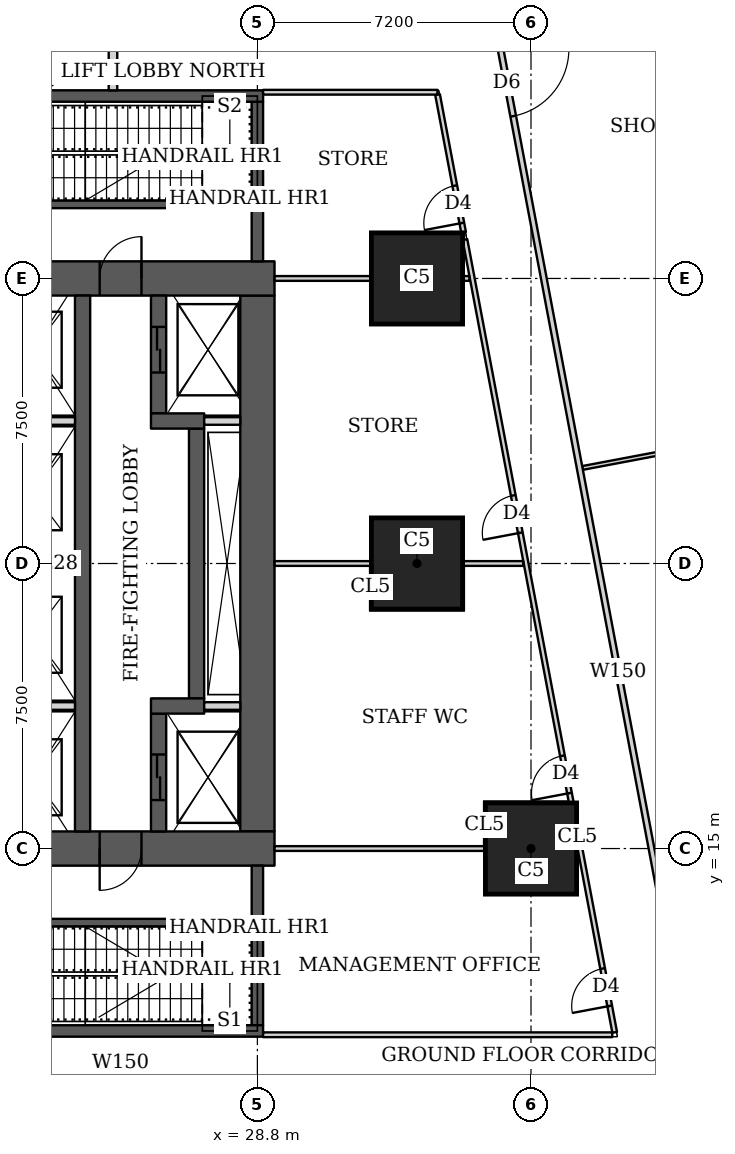
"""IFC4 building model, lengths in metres.
Left out: names, types, materials, properties, quantities, classifications, styles, units other than length and angle.
Written with IfcOpenShell. Run it as: python <this file> out.ifc"""

import sys

from ifc_helpers import new_model, si_unit, direction, frame, frame_2d, origin, origin_2d, place, context, subcontext, project, spatial, rectangle, extrude, element, fill, save


model = new_model("IFC4")
c1 = context("Model", 3, precision=1e-05, world=origin(), true_north=direction((0.0, 1.0)))
c2 = subcontext(c1, "Body", "Model", "MODEL_VIEW")
j1 = project(units=[si_unit("LENGTHUNIT", "METRE"), si_unit("PLANEANGLEUNIT", "RADIAN")], contexts=[c1])
p1 = place(None, origin())
s1 = spatial("IfcSite", under=j1, at=p1, CompositionType="ELEMENT")
p2 = place(p1, origin())
s2 = spatial("IfcBuilding", under=s1, at=p2, CompositionType="ELEMENT")
p3 = place(p2, origin())
s3 = spatial("IfcBuildingStorey", under=s2, at=p3, CompositionType="ELEMENT", Elevation=0.0)
for number, where, z_axis, x_axis in (
    (1, (36.0, 15.0, 0.0), (0.0, 0.0, 1.0), (1.0, 0.0, 0.0)),
    (2, (33.0, 22.5, 0.0), (0.0, 0.0, 1.0), (1.0, 0.0, 0.0)),
    (3, (33.0, 30.0, 0.0), (0.0, 0.0, 1.0), (1.0, 0.0, 0.0)),
):
    element("IfcColumn", number, at=place(p3, frame(where, z_axis=z_axis, x_axis=x_axis)), inside=s3, PredefinedType="COLUMN", context=c2, shape_type="SweptSolid", body=[
        extrude(rectangle(XDim=2.4, YDim=2.4, at=origin_2d()), origin(), (0.0, 0.0, 1.0), 5.6),
    ])
p4 = place(p3, frame((13.95, 15.0, 0.0), z_axis=(0.0, 0.0, 1.0), x_axis=(1.0, 0.0, 0.0)))
e4 = element("IfcWall", 4, at=p4, inside=s3, PredefinedType="SHEAR", context=c2, shape_type="SweptSolid", body=[
    extrude(rectangle(XDim=15.3, YDim=0.9, at=frame_2d((7.65, 0.0))), origin(), (0.0, 0.0, 1.0), 5.6),
])
p5 = place(p4, frame((4.45, 0.0, 0.0)))
e5 = element("IfcOpeningElement", 5, at=p5, cuts=e4, PredefinedType="OPENING", context=c2, shape_type="SweptSolid", body=[
    extrude(rectangle(XDim=1.8, YDim=2.1, at=frame_2d((0.9, 1.05))), frame((0.0, 0.46, 0.0), z_axis=(0.0, -1.0, 0.0), x_axis=(1.0, 0.0, 0.0)), (0.0, 0.0, 1.0), 0.92),
])
p6 = place(p4, frame((10.7, 0.0, 0.0)))
e6 = element("IfcOpeningElement", 6, at=p6, cuts=e4, PredefinedType="OPENING", context=c2, shape_type="SweptSolid", body=[
    extrude(rectangle(XDim=1.1, YDim=2.1, at=frame_2d((0.55, 1.05))), frame((0.0, 0.46, 0.0), z_axis=(0.0, -1.0, 0.0), x_axis=(1.0, 0.0, 0.0)), (0.0, 0.0, 1.0), 0.92),
])
p7 = place(p3, frame((13.95, 30.0, 0.0), z_axis=(0.0, 0.0, 1.0), x_axis=(1.0, 0.0, 0.0)))
e7 = element("IfcWall", 7, at=p7, inside=s3, PredefinedType="SHEAR", context=c2, shape_type="SweptSolid", body=[
    extrude(rectangle(XDim=15.3, YDim=0.9, at=frame_2d((7.65, 0.0))), origin(), (0.0, 0.0, 1.0), 5.6),
])
p8 = place(p7, frame((4.45, 0.0, 0.0)))
e8 = element("IfcOpeningElement", 8, at=p8, cuts=e7, PredefinedType="OPENING", context=c2, shape_type="SweptSolid", body=[
    extrude(rectangle(XDim=1.8, YDim=2.1, at=frame_2d((0.9, 1.05))), frame((0.0, 0.46, 0.0), z_axis=(0.0, -1.0, 0.0), x_axis=(1.0, 0.0, 0.0)), (0.0, 0.0, 1.0), 0.92),
])
p9 = place(p7, frame((10.7, 0.0, 0.0)))
e9 = element("IfcOpeningElement", 9, at=p9, cuts=e7, PredefinedType="OPENING", context=c2, shape_type="SweptSolid", body=[
    extrude(rectangle(XDim=1.1, YDim=2.1, at=frame_2d((0.55, 1.05))), frame((0.0, 0.46, 0.0), z_axis=(0.0, -1.0, 0.0), x_axis=(1.0, 0.0, 0.0)), (0.0, 0.0, 1.0), 0.92),
])
p10 = place(p3, frame((28.8, 15.45, 0.0), z_axis=(0.0, 0.0, 1.0), x_axis=(0.0, 1.0, 0.0)))
e10 = element("IfcWall", 10, at=p10, inside=s3, PredefinedType="SHEAR", context=c2, shape_type="SweptSolid", body=[
    extrude(rectangle(XDim=14.1, YDim=0.9, at=frame_2d((7.05, 0.0))), origin(), (0.0, 0.0, 1.0), 5.6),
])
p11 = place(p3, frame((24.2, 15.45, 0.0), z_axis=(0.0, 0.0, 1.0), x_axis=(0.0, 1.0, 0.0)))
e11 = element("IfcWall", 11, at=p11, inside=s3, PredefinedType="SHEAR", context=c2, shape_type="SweptSolid", body=[
    extrude(rectangle(XDim=14.1, YDim=0.4, at=frame_2d((7.05, 0.0))), origin(), (0.0, 0.0, 1.0), 5.6),
])
p12 = place(p3, frame((26.2, 15.45, 0.0), z_axis=(0.0, 0.0, 1.0), x_axis=(0.0, 1.0, 0.0)))
e12 = element("IfcWall", 12, at=p12, inside=s3, PredefinedType="SHEAR", context=c2, shape_type="SweptSolid", body=[
    extrude(rectangle(XDim=3.1, YDim=0.4, at=frame_2d((1.55, 0.0))), origin(), (0.0, 0.0, 1.0), 5.6),
])
p13 = place(p12, frame((0.825, 0.0, 0.0)))
e13 = element("IfcOpeningElement", 13, at=p13, cuts=e12, PredefinedType="OPENING", context=c2, shape_type="SweptSolid", body=[
    extrude(rectangle(XDim=1.2, YDim=2.1, at=frame_2d((0.6, 1.05))), frame((0.0, 0.21, 0.0), z_axis=(0.0, -1.0, 0.0), x_axis=(1.0, 0.0, 0.0)), (0.0, 0.0, 1.0), 0.42),
])
p14 = place(p3, frame((26.0, 18.75, 0.0), z_axis=(0.0, 0.0, 1.0), x_axis=(1.0, 0.0, 0.0)))
e14 = element("IfcWall", 14, at=p14, inside=s3, PredefinedType="SHEAR", context=c2, shape_type="SweptSolid", body=[
    extrude(rectangle(XDim=1.4, YDim=0.4, at=frame_2d((0.7, 0.0))), origin(), (0.0, 0.0, 1.0), 5.6),
])
p15 = place(p3, frame((27.2, 18.95, 0.0), z_axis=(0.0, 0.0, 1.0), x_axis=(0.0, 1.0, 0.0)))
e15 = element("IfcWall", 15, at=p15, inside=s3, PredefinedType="SHEAR", context=c2, shape_type="SweptSolid", body=[
    extrude(rectangle(XDim=7.1, YDim=0.4, at=frame_2d((3.55, 0.0))), origin(), (0.0, 0.0, 1.0), 5.6),
])
p16 = place(p3, frame((26.0, 26.25, 0.0), z_axis=(0.0, 0.0, 1.0), x_axis=(1.0, 0.0, 0.0)))
e16 = element("IfcWall", 16, at=p16, inside=s3, PredefinedType="SHEAR", context=c2, shape_type="SweptSolid", body=[
    extrude(rectangle(XDim=1.4, YDim=0.4, at=frame_2d((0.7, 0.0))), origin(), (0.0, 0.0, 1.0), 5.6),
])
p17 = place(p3, frame((26.2, 26.45, 0.0), z_axis=(0.0, 0.0, 1.0), x_axis=(0.0, 1.0, 0.0)))
e17 = element("IfcWall", 17, at=p17, inside=s3, PredefinedType="SHEAR", context=c2, shape_type="SweptSolid", body=[
    extrude(rectangle(XDim=3.1, YDim=0.4, at=frame_2d((1.55, 0.0))), origin(), (0.0, 0.0, 1.0), 5.6),
])
p18 = place(p17, frame((1.075, 0.0, 0.0)))
e18 = element("IfcOpeningElement", 18, at=p18, cuts=e17, PredefinedType="OPENING", context=c2, shape_type="SweptSolid", body=[
    extrude(rectangle(XDim=1.2, YDim=2.1, at=frame_2d((0.6, 1.05))), frame((0.0, 0.21, 0.0), z_axis=(0.0, -1.0, 0.0), x_axis=(1.0, 0.0, 0.0)), (0.0, 0.0, 1.0), 0.42),
])
p19 = place(p3, frame((21.45, 10.2, 0.0), z_axis=(0.0, 0.0, 1.0), x_axis=(1.0, 0.0, 0.0)))
e19 = element("IfcWall", 19, at=p19, inside=s3, PredefinedType="SHEAR", context=c2, shape_type="SweptSolid", body=[
    extrude(rectangle(XDim=7.5, YDim=0.3, at=frame_2d((3.75, 0.0))), origin(), (0.0, 0.0, 1.0), 5.6),
])
p20 = place(p19, frame((0.5, 0.0, 0.0)))
e20 = element("IfcOpeningElement", 20, at=p20, cuts=e19, PredefinedType="OPENING", context=c2, shape_type="SweptSolid", body=[
    extrude(rectangle(XDim=1.1, YDim=2.1, at=frame_2d((0.55, 1.05))), frame((0.0, 0.16, 0.0), z_axis=(0.0, -1.0, 0.0), x_axis=(1.0, 0.0, 0.0)), (0.0, 0.0, 1.0), 0.32),
])
p21 = place(p3, frame((28.8, 10.35, 0.0), z_axis=(0.0, 0.0, 1.0), x_axis=(0.0, 1.0, 0.0)))
e21 = element("IfcWall", 21, at=p21, inside=s3, PredefinedType="SHEAR", context=c2, shape_type="SweptSolid", body=[
    extrude(rectangle(XDim=4.2, YDim=0.3, at=frame_2d((2.1, 0.0))), origin(), (0.0, 0.0, 1.0), 5.6),
])
p22 = place(p3, frame((21.45, 34.8, 0.0), z_axis=(0.0, 0.0, 1.0), x_axis=(1.0, 0.0, 0.0)))
e22 = element("IfcWall", 22, at=p22, inside=s3, PredefinedType="SHEAR", context=c2, shape_type="SweptSolid", body=[
    extrude(rectangle(XDim=7.5, YDim=0.3, at=frame_2d((3.75, 0.0))), origin(), (0.0, 0.0, 1.0), 5.6),
])
p23 = place(p22, frame((0.5, 0.0, 0.0)))
e23 = element("IfcOpeningElement", 23, at=p23, cuts=e22, PredefinedType="OPENING", context=c2, shape_type="SweptSolid", body=[
    extrude(rectangle(XDim=1.1, YDim=2.1, at=frame_2d((0.55, 1.05))), frame((0.0, 0.16, 0.0), z_axis=(0.0, -1.0, 0.0), x_axis=(1.0, 0.0, 0.0)), (0.0, 0.0, 1.0), 0.32),
])
p24 = place(p3, frame((28.8, 30.45, 0.0), z_axis=(0.0, 0.0, 1.0), x_axis=(0.0, 1.0, 0.0)))
e24 = element("IfcWall", 24, at=p24, inside=s3, PredefinedType="SHEAR", context=c2, shape_type="SweptSolid", body=[
    extrude(rectangle(XDim=4.2, YDim=0.3, at=frame_2d((2.1, 0.0))), origin(), (0.0, 0.0, 1.0), 5.6),
])
p25 = place(p3, frame((35.151, 36.285, 0.0), z_axis=(0.0, 0.0, 1.0), x_axis=(0.185575970071, -0.982629919823, 0.0)))
e25 = element("IfcWall", 25, at=p25, inside=s3, PredefinedType="SOLIDWALL", context=c2, shape_type="SweptSolid", body=[
    extrude(rectangle(XDim=33.841, YDim=0.15, at=frame_2d((16.92, 0.0))), origin(), (0.0, 0.0, 1.0), 3.7),
])
p26 = place(p25, frame((0.25, 0.0, 0.0)))
e26 = element("IfcOpeningElement", 26, at=p26, cuts=e25, PredefinedType="OPENING", context=c2, shape_type="SweptSolid", body=[
    extrude(rectangle(XDim=1.8, YDim=2.1, at=frame_2d((0.9, 1.05))), frame((0.0, 0.085, 0.0), z_axis=(0.0, -1.0, 0.0), x_axis=(1.0, 0.0, 0.0)), (0.0, 0.0, 1.0), 0.17),
])
p27 = place(p25, frame((24.261, 0.0, 0.0)))
e27 = element("IfcOpeningElement", 27, at=p27, cuts=e25, PredefinedType="OPENING", context=c2, shape_type="SweptSolid", body=[
    extrude(rectangle(XDim=1.8, YDim=2.1, at=frame_2d((0.9, 1.05))), frame((0.0, 0.085, 0.0), z_axis=(0.0, -1.0, 0.0), x_axis=(1.0, 0.0, 0.0)), (0.0, 0.0, 1.0), 0.17),
])
p28 = place(p3, frame((25.0, 34.95, 0.0), z_axis=(0.0, 0.0, 1.0), x_axis=(0.0, 1.0, 0.0)))
e28 = element("IfcWall", 28, at=p28, inside=s3, PredefinedType="SOLIDWALL", context=c2, shape_type="SweptSolid", body=[
    extrude(rectangle(XDim=8.65, YDim=0.225, at=frame_2d((4.325, 0.0))), origin(), (0.0, 0.0, 1.0), 3.5),
])
p29 = place(p3, frame((43.988, 26.267, 0.0), z_axis=(0.0, 0.0, 1.0), x_axis=(-0.982612004876, -0.185670805118, 0.0)))
e29 = element("IfcWall", 29, at=p29, inside=s3, PredefinedType="PARTITIONING", context=c2, shape_type="SweptSolid", body=[
    extrude(rectangle(XDim=6.75, YDim=0.1, at=frame_2d((3.375, 0.0))), origin(), (0.0, 0.0, 1.0), 3.5),
])
p30 = place(p3, frame((28.95, 10.1, 0.0), z_axis=(0.0, 0.0, 1.0), x_axis=(1.0, 0.0, 0.0)))
e30 = element("IfcWall", 30, at=p30, inside=s3, PredefinedType="PARTITIONING", context=c2, shape_type="SweptSolid", body=[
    extrude(rectangle(XDim=9.188, YDim=0.125, at=frame_2d((4.594, 0.0))), origin(), (0.0, 0.0, 1.0), 3.3),
])
p31 = place(p3, frame((28.95, 34.9, 0.0), z_axis=(0.0, 0.0, 1.0), x_axis=(1.0, 0.0, 0.0)))
e31 = element("IfcWall", 31, at=p31, inside=s3, PredefinedType="PARTITIONING", context=c2, shape_type="SweptSolid", body=[
    extrude(rectangle(XDim=4.588, YDim=0.125, at=frame_2d((2.294, 0.0))), origin(), (0.0, 0.0, 1.0), 3.3),
])
p32 = place(p3, frame((38.202, 10.163, 0.0), z_axis=(0.0, 0.0, 1.0), x_axis=(-0.185539561605, 0.982636795097, 0.0)))
e32 = element("IfcWall", 32, at=p32, inside=s3, PredefinedType="PARTITIONING", context=c2, shape_type="SweptSolid", body=[
    extrude(rectangle(XDim=5.066, YDim=0.125, at=frame_2d((2.533, 0.0))), origin(), (0.0, 0.0, 1.0), 3.7),
])
p33 = place(p32, frame((0.708, 0.0, 0.0)))
e33 = element("IfcOpeningElement", 33, at=p33, cuts=e32, PredefinedType="OPENING", context=c2, shape_type="SweptSolid", body=[
    extrude(rectangle(XDim=1.0, YDim=2.1, at=frame_2d((0.5, 1.05))), frame((0.0, 0.073, 0.0), z_axis=(0.0, -1.0, 0.0), x_axis=(1.0, 0.0, 0.0)), (0.0, 0.0, 1.0), 0.145),
])
p34 = place(p3, frame((37.059, 16.213, 0.0), z_axis=(0.0, 0.0, 1.0), x_axis=(-0.185585225745, 0.982628171785, 0.0)))
e34 = element("IfcWall", 34, at=p34, inside=s3, PredefinedType="PARTITIONING", context=c2, shape_type="SweptSolid", body=[
    extrude(rectangle(XDim=15.072, YDim=0.125, at=frame_2d((7.536, 0.0))), origin(), (0.0, 0.0, 1.0), 3.7),
])
p35 = place(p34, frame((0.25, 0.0, 0.0)))
e35 = element("IfcOpeningElement", 35, at=p35, cuts=e34, PredefinedType="OPENING", context=c2, shape_type="SweptSolid", body=[
    extrude(rectangle(XDim=1.0, YDim=2.1, at=frame_2d((0.5, 1.05))), frame((0.0, 0.073, 0.0), z_axis=(0.0, -1.0, 0.0), x_axis=(1.0, 0.0, 0.0)), (0.0, 0.0, 1.0), 0.145),
])
p36 = place(p34, frame((7.221, 0.0, 0.0)))
e36 = element("IfcOpeningElement", 36, at=p36, cuts=e34, PredefinedType="OPENING", context=c2, shape_type="SweptSolid", body=[
    extrude(rectangle(XDim=1.0, YDim=2.1, at=frame_2d((0.5, 1.05))), frame((0.0, 0.073, 0.0), z_axis=(0.0, -1.0, 0.0), x_axis=(1.0, 0.0, 0.0)), (0.0, 0.0, 1.0), 0.145),
])
p37 = place(p3, frame((34.226, 31.213, 0.0), z_axis=(0.0, 0.0, 1.0), x_axis=(-0.185694811189, 0.982607468472, 0.0)))
e37 = element("IfcWall", 37, at=p37, inside=s3, PredefinedType="PARTITIONING", context=c2, shape_type="SweptSolid", body=[
    extrude(rectangle(XDim=3.689, YDim=0.125, at=frame_2d((1.845, 0.0))), origin(), (0.0, 0.0, 1.0), 5.3),
])
p38 = place(p37, frame((0.25, 0.0, 0.0)))
e38 = element("IfcOpeningElement", 38, at=p38, cuts=e37, PredefinedType="OPENING", context=c2, shape_type="SweptSolid", body=[
    extrude(rectangle(XDim=1.0, YDim=2.1, at=frame_2d((0.5, 1.05))), frame((0.0, 0.073, 0.0), z_axis=(0.0, -1.0, 0.0), x_axis=(1.0, 0.0, 0.0)), (0.0, 0.0, 1.0), 0.145),
])
p39 = place(p3, frame((29.25, 15.0, 0.0), z_axis=(0.0, 0.0, 1.0), x_axis=(1.0, 0.0, 0.0)))
e39 = element("IfcWall", 39, at=p39, inside=s3, PredefinedType="PARTITIONING", context=c2, shape_type="SweptSolid", body=[
    extrude(rectangle(XDim=5.549, YDim=0.125, at=frame_2d((2.774, 0.0))), origin(), (0.0, 0.0, 1.0), 5.3),
])
p40 = place(p3, frame((29.25, 22.5, 0.0), z_axis=(0.0, 0.0, 1.0), x_axis=(1.0, 0.0, 0.0)))
e40 = element("IfcWall", 40, at=p40, inside=s3, PredefinedType="PARTITIONING", context=c2, shape_type="SweptSolid", body=[
    extrude(rectangle(XDim=2.549, YDim=0.125, at=frame_2d((1.274, 0.0))), origin(), (0.0, 0.0, 1.0), 3.7),
])
p41 = place(p3, frame((34.201, 22.5, 0.0), z_axis=(0.0, 0.0, 1.0), x_axis=(1.0, 0.0, 0.0)))
e41 = element("IfcWall", 41, at=p41, inside=s3, PredefinedType="PARTITIONING", context=c2, shape_type="SweptSolid", body=[
    extrude(rectangle(XDim=1.595, YDim=0.125, at=frame_2d((0.797, 0.0))), origin(), (0.0, 0.0, 1.0), 3.7),
])
p42 = place(p3, frame((29.25, 30.0, 0.0), z_axis=(0.0, 0.0, 1.0), x_axis=(1.0, 0.0, 0.0)))
e42 = element("IfcWall", 42, at=p42, inside=s3, PredefinedType="PARTITIONING", context=c2, shape_type="SweptSolid", body=[
    extrude(rectangle(XDim=2.549, YDim=0.125, at=frame_2d((1.274, 0.0))), origin(), (0.0, 0.0, 1.0), 5.3),
])
p43 = place(p3, frame((34.201, 30.0, 0.0), z_axis=(0.0, 0.0, 1.0), x_axis=(1.0, 0.0, 0.0)))
e43 = element("IfcWall", 43, at=p43, inside=s3, PredefinedType="PARTITIONING", context=c2, shape_type="SweptSolid", body=[
    extrude(rectangle(XDim=0.178, YDim=0.125, at=frame_2d((0.089, 0.0))), origin(), (0.0, 0.0, 1.0), 3.7),
])
for number, where, z_axis, x_axis in (
    (44, (23.0, 13.05, 0.0), (0.0, 0.0, 1.0), (1.0, 0.0, 0.0)),
    (45, (23.0, 31.95, 0.0), (0.0, 0.0, 1.0), (1.0, 0.0, 0.0)),
):
    element("IfcWall", number, at=place(p3, frame(where, z_axis=z_axis, x_axis=x_axis)), inside=s3, PredefinedType="SHEAR", context=c2, shape_type="SweptSolid", body=[
        extrude(rectangle(XDim=5.8, YDim=0.2, at=frame_2d((2.9, 0.0))), origin(), (0.0, 0.0, 1.0), 5.6),
    ])
for number, where, z_axis, x_axis in (
    (46, (21.8, 18.75, 0.0), (0.0, 0.0, 1.0), (1.0, 0.0, 0.0)),
    (47, (21.8, 22.5, 0.0), (0.0, 0.0, 1.0), (1.0, 0.0, 0.0)),
    (48, (21.8, 26.25, 0.0), (0.0, 0.0, 1.0), (1.0, 0.0, 0.0)),
):
    element("IfcWall", number, at=place(p3, frame(where, z_axis=z_axis, x_axis=x_axis)), inside=s3, PredefinedType="SOLIDWALL", context=c2, shape_type="SweptSolid", body=[
        extrude(rectangle(XDim=2.2, YDim=0.2, at=frame_2d((1.1, 0.0))), origin(), (0.0, 0.0, 1.0), 5.3),
    ])
for number, where, z_axis, x_axis in (
    (49, (27.4, 18.75, 0.0), (0.0, 0.0, 1.0), (1.0, 0.0, 0.0)),
    (50, (27.4, 26.25, 0.0), (0.0, 0.0, 1.0), (1.0, 0.0, 0.0)),
):
    element("IfcWall", number, at=place(p3, frame(where, z_axis=z_axis, x_axis=x_axis)), inside=s3, PredefinedType="SOLIDWALL", context=c2, shape_type="SweptSolid", body=[
        extrude(rectangle(XDim=0.95, YDim=0.2, at=frame_2d((0.475, 0.0))), origin(), (0.0, 0.0, 1.0), 5.3),
    ])
p44 = place(p26, origin())
e51 = element("IfcDoor", 51, at=p44, inside=s3, OperationType="DOUBLE_DOOR_SINGLE_SWING", PredefinedType="DOOR", context=c2, shape_type="SweptSolid", body=[
    extrude(rectangle(XDim=1.8, YDim=2.1, at=frame_2d((0.9, 1.05))), frame((0.0, 0.025, 0.0), z_axis=(0.0, -1.0, 0.0), x_axis=(1.0, 0.0, 0.0)), (0.0, 0.0, 1.0), 0.05),
])
fill(e26, e51)
p45 = place(p33, origin())
e52 = element("IfcDoor", 52, at=p45, inside=s3, OperationType="SINGLE_SWING_LEFT", PredefinedType="DOOR", context=c2, shape_type="SweptSolid", body=[
    extrude(rectangle(XDim=1.0, YDim=2.1, at=frame_2d((0.5, 1.05))), frame((0.0, 0.025, 0.0), z_axis=(0.0, -1.0, 0.0), x_axis=(1.0, 0.0, 0.0)), (0.0, 0.0, 1.0), 0.05),
])
fill(e33, e52)
p46 = place(p35, origin())
e53 = element("IfcDoor", 53, at=p46, inside=s3, OperationType="SINGLE_SWING_LEFT", PredefinedType="DOOR", context=c2, shape_type="SweptSolid", body=[
    extrude(rectangle(XDim=1.0, YDim=2.1, at=frame_2d((0.5, 1.05))), frame((0.0, 0.025, 0.0), z_axis=(0.0, -1.0, 0.0), x_axis=(1.0, 0.0, 0.0)), (0.0, 0.0, 1.0), 0.05),
])
fill(e35, e53)
p47 = place(p36, origin())
e54 = element("IfcDoor", 54, at=p47, inside=s3, OperationType="SINGLE_SWING_LEFT", PredefinedType="DOOR", context=c2, shape_type="SweptSolid", body=[
    extrude(rectangle(XDim=1.0, YDim=2.1, at=frame_2d((0.5, 1.05))), frame((0.0, 0.025, 0.0), z_axis=(0.0, -1.0, 0.0), x_axis=(1.0, 0.0, 0.0)), (0.0, 0.0, 1.0), 0.05),
])
fill(e36, e54)
p48 = place(p38, origin())
e55 = element("IfcDoor", 55, at=p48, inside=s3, OperationType="SINGLE_SWING_LEFT", PredefinedType="DOOR", context=c2, shape_type="SweptSolid", body=[
    extrude(rectangle(XDim=1.0, YDim=2.1, at=frame_2d((0.5, 1.05))), frame((0.0, 0.025, 0.0), z_axis=(0.0, -1.0, 0.0), x_axis=(1.0, 0.0, 0.0)), (0.0, 0.0, 1.0), 0.05),
])
fill(e38, e55)
p49 = place(p6, origin())
e56 = element("IfcDoor", 56, at=p49, inside=s3, OperationType="SINGLE_SWING_RIGHT", PredefinedType="DOOR", context=c2, shape_type="SweptSolid", body=[
    extrude(rectangle(XDim=1.1, YDim=2.1, at=frame_2d((0.55, 1.05))), frame((0.0, 0.025, 0.0), z_axis=(0.0, -1.0, 0.0), x_axis=(1.0, 0.0, 0.0)), (0.0, 0.0, 1.0), 0.05),
])
fill(e6, e56)
p50 = place(p9, origin())
e57 = element("IfcDoor", 57, at=p50, inside=s3, OperationType="SINGLE_SWING_RIGHT", PredefinedType="DOOR", context=c2, shape_type="SweptSolid", body=[
    extrude(rectangle(XDim=1.1, YDim=2.1, at=frame_2d((0.55, 1.05))), frame((0.0, 0.025, 0.0), z_axis=(0.0, -1.0, 0.0), x_axis=(1.0, 0.0, 0.0)), (0.0, 0.0, 1.0), 0.05),
])
fill(e9, e57)
p51 = place(p13, origin())
e58 = element("IfcDoor", 58, at=p51, inside=s3, OperationType="DOUBLE_DOOR_SLIDING", PredefinedType="DOOR", context=c2, shape_type="SweptSolid", body=[
    extrude(rectangle(XDim=1.2, YDim=2.1, at=frame_2d((0.6, 1.05))), frame((0.0, 0.025, 0.0), z_axis=(0.0, -1.0, 0.0), x_axis=(1.0, 0.0, 0.0)), (0.0, 0.0, 1.0), 0.05),
])
fill(e13, e58)
p52 = place(p18, origin())
e59 = element("IfcDoor", 59, at=p52, inside=s3, OperationType="DOUBLE_DOOR_SLIDING", PredefinedType="DOOR", context=c2, shape_type="SweptSolid", body=[
    extrude(rectangle(XDim=1.2, YDim=2.1, at=frame_2d((0.6, 1.05))), frame((0.0, 0.025, 0.0), z_axis=(0.0, -1.0, 0.0), x_axis=(1.0, 0.0, 0.0)), (0.0, 0.0, 1.0), 0.05),
])
fill(e18, e59)
save(model, sys.argv[1])
